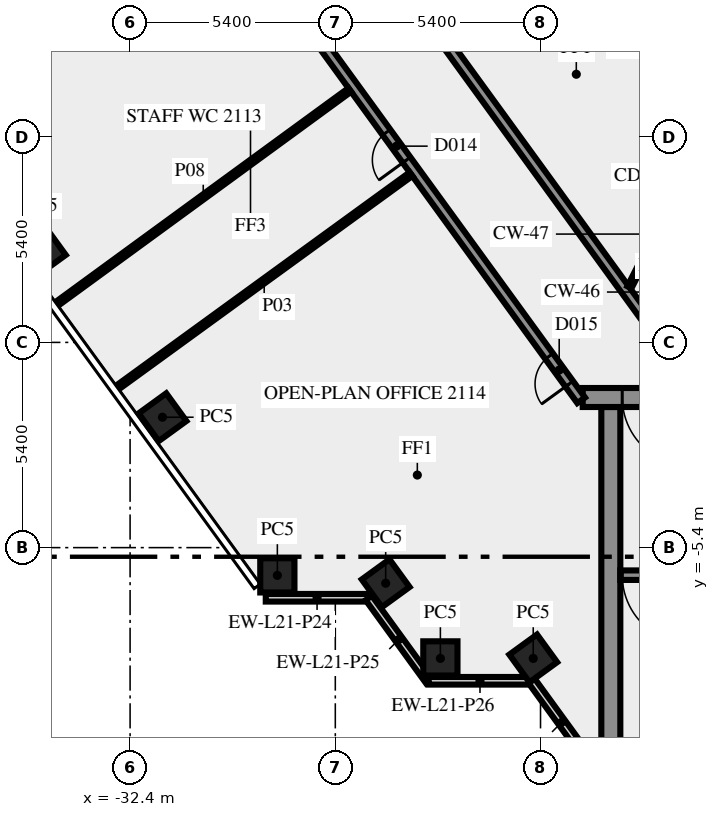
"""IFC4 building model, lengths in metres.
Left out: names, types, materials, properties, quantities, classifications, styles, units other than length and angle.
Written with IfcOpenShell. Run it as: python <this file> out.ifc"""

import sys

from ifc_helpers import new_model, si_unit, direction, frame, frame_2d, origin, origin_2d, place, context, subcontext, project, spatial, rectangle, extrude, element, fill, save


model = new_model("IFC4")
c1 = context("Model", 3, precision=1e-05, world=origin(), true_north=direction((0.0, 1.0)))
c2 = subcontext(c1, "Body", "Model", "MODEL_VIEW")
j1 = project(units=[si_unit("LENGTHUNIT", "METRE"), si_unit("PLANEANGLEUNIT", "RADIAN")], contexts=[c1])
p1 = place(None, origin())
s1 = spatial("IfcSite", under=j1, at=p1, CompositionType="ELEMENT")
p2 = place(p1, origin())
s2 = spatial("IfcBuilding", under=s1, at=p2, CompositionType="ELEMENT")
p3 = place(p2, frame((0.0, 0.0, 93.0)))
s3 = spatial("IfcBuildingStorey", under=s2, at=p3, CompositionType="ELEMENT", Elevation=93.0)
for number, where, z_axis, x_axis in (
    (1, (-34.722, 2.4, 0.0), (0.0, 0.0, 1.0), (0.588, -0.809, 0.0)),
    (2, (-31.548, -1.969, 0.0), (0.0, 0.0, 1.0), (0.588, -0.809, 0.0)),
    (3, (-28.525, -6.13, 0.0), (0.0, 0.0, 1.0), (1.0, 0.0, 0.0)),
    (4, (-25.674, -6.337, 0.0), (0.0, 0.0, 1.0), (0.588, -0.809, 0.0)),
    (5, (-24.235, -8.315, 0.0), (0.0, 0.0, 1.0), (1.0, 0.0, 0.0)),
    (6, (-21.792, -8.315, 0.0), (0.0, 0.0, 1.0), (0.588, -0.809, 0.0)),
):
    element("IfcColumn", number, at=place(p3, frame(where, z_axis=z_axis, x_axis=x_axis)), inside=s3, PredefinedType="COLUMN", context=c2, shape_type="SweptSolid", body=[
        extrude(rectangle(XDim=0.9, YDim=0.9, at=origin_2d()), origin(), (0.0, 0.0, 1.0), 3.65),
    ])
p4 = place(p3, frame((-28.83, -6.719, 0.0), z_axis=(0.0, 0.0, 1.0), x_axis=(1.0, 0.0, 0.0)))
e7 = element("IfcWall", 7, at=p4, inside=s3, PredefinedType="SOLIDWALL", context=c2, shape_type="SweptSolid", body=[
    extrude(rectangle(XDim=2.7, YDim=0.2, at=frame_2d((1.35, 0.0))), origin(), (0.0, 0.0, 1.0), 3.65),
])
p5 = place(p3, frame((-26.12, -6.724, 0.0), z_axis=(0.0, 0.0, 1.0), x_axis=(0.587720002413, -0.809064397168, 0.0)))
e8 = element("IfcWall", 8, at=p5, inside=s3, PredefinedType="SOLIDWALL", context=c2, shape_type="SweptSolid", body=[
    extrude(rectangle(XDim=2.7, YDim=0.2, at=frame_2d((1.35, 0.0))), origin(), (0.0, 0.0, 1.0), 3.65),
])
p6 = place(p3, frame((-24.543, -8.904, 0.0), z_axis=(0.0, 0.0, 1.0), x_axis=(1.0, 0.0, 0.0)))
e9 = element("IfcWall", 9, at=p6, inside=s3, PredefinedType="SOLIDWALL", context=c2, shape_type="SweptSolid", body=[
    extrude(rectangle(XDim=2.7, YDim=0.2, at=frame_2d((1.35, 0.0))), origin(), (0.0, 0.0, 1.0), 3.65),
])
p7 = place(p3, frame((-21.833, -8.909, 0.0), z_axis=(0.0, 0.0, 1.0), x_axis=(0.587766567315, -0.809030569476, 0.0)))
e10 = element("IfcWall", 10, at=p7, inside=s3, PredefinedType="SOLIDWALL", context=c2, shape_type="SweptSolid", body=[
    extrude(rectangle(XDim=2.688, YDim=0.2, at=frame_2d((1.344, 0.0))), origin(), (0.0, 0.0, 1.0), 3.65),
])
p8 = place(p3, frame((-19.75, -10.5, 0.0), z_axis=(0.0, 0.0, 1.0), x_axis=(0.0, 1.0, 0.0)))
e11 = element("IfcWall", 11, at=p8, inside=s3, PredefinedType="SHEAR", context=c2, shape_type="SweptSolid", body=[
    extrude(rectangle(XDim=8.8, YDim=0.5, at=frame_2d((4.4, 0.0))), origin(), (0.0, 0.0, 1.0), 3.65),
])
p9 = place(p3, frame((-11.45, -6.125, 0.0), z_axis=(0.0, 0.0, 1.0), x_axis=(-1.0, 0.0, 0.0)))
e12 = element("IfcWall", 12, at=p9, inside=s3, PredefinedType="SHEAR", context=c2, shape_type="SweptSolid", body=[
    extrude(rectangle(XDim=8.05, YDim=0.25, at=frame_2d((4.025, 0.0))), origin(), (0.0, 0.0, 1.0), 3.65),
])
p10 = place(p9, frame((6.2, 0.0, 0.0)))
e13 = element("IfcOpeningElement", 13, at=p10, cuts=e12, PredefinedType="OPENING", context=c2, shape_type="SweptSolid", body=[
    extrude(rectangle(XDim=1.8, YDim=2.1, at=frame_2d((0.9, 1.05))), frame((0.0, 0.135, 0.0), z_axis=(0.0, -1.0, 0.0), x_axis=(1.0, 0.0, 0.0)), (0.0, 0.0, 1.0), 0.27),
])
p11 = place(p3, frame((20.49, -1.45, 0.0), z_axis=(0.0, 0.0, 1.0), x_axis=(-1.0, 0.0, 0.0)))
e14 = element("IfcWall", 14, at=p11, inside=s3, PredefinedType="SHEAR", context=c2, shape_type="SweptSolid", body=[
    extrude(rectangle(XDim=40.98, YDim=0.5, at=frame_2d((20.49, 0.0))), origin(), (0.0, 0.0, 1.0), 3.65),
])
p12 = place(p11, frame((38.14, 0.0, 0.0)))
e15 = element("IfcOpeningElement", 15, at=p12, cuts=e14, PredefinedType="OPENING", context=c2, shape_type="SweptSolid", body=[
    extrude(rectangle(XDim=1.8, YDim=2.1, at=frame_2d((0.9, 1.05))), frame((0.0, 0.26, 0.0), z_axis=(0.0, -1.0, 0.0), x_axis=(1.0, 0.0, 0.0)), (0.0, 0.0, 1.0), 0.52),
])
p13 = place(p11, frame((35.89, 0.0, 0.0)))
e16 = element("IfcOpeningElement", 16, at=p13, cuts=e14, PredefinedType="OPENING", context=c2, shape_type="SweptSolid", body=[
    extrude(rectangle(XDim=0.9, YDim=2.1, at=frame_2d((0.45, 1.05))), frame((0.0, 0.26, 0.0), z_axis=(0.0, -1.0, 0.0), x_axis=(1.0, 0.0, 0.0)), (0.0, 0.0, 1.0), 0.52),
])
p14 = place(p11, frame((32.94, 0.0, 0.0)))
e17 = element("IfcOpeningElement", 17, at=p14, cuts=e14, PredefinedType="OPENING", context=c2, shape_type="SweptSolid", body=[
    extrude(rectangle(XDim=0.9, YDim=2.1, at=frame_2d((0.45, 1.05))), frame((0.0, 0.26, 0.0), z_axis=(0.0, -1.0, 0.0), x_axis=(1.0, 0.0, 0.0)), (0.0, 0.0, 1.0), 0.52),
])
p15 = place(p11, frame((21.765, 0.0, 0.0)))
e18 = element("IfcOpeningElement", 18, at=p15, cuts=e14, PredefinedType="OPENING", context=c2, shape_type="SweptSolid", body=[
    extrude(rectangle(XDim=2.0, YDim=2.1, at=frame_2d((1.0, 1.05))), frame((0.0, 0.26, 0.0), z_axis=(0.0, -1.0, 0.0), x_axis=(1.0, 0.0, 0.0)), (0.0, 0.0, 1.0), 0.52),
])
p16 = place(p11, frame((7.14, 0.0, 0.0)))
e19 = element("IfcOpeningElement", 19, at=p16, cuts=e14, PredefinedType="OPENING", context=c2, shape_type="SweptSolid", body=[
    extrude(rectangle(XDim=0.9, YDim=2.1, at=frame_2d((0.45, 1.05))), frame((0.0, 0.26, 0.0), z_axis=(0.0, -1.0, 0.0), x_axis=(1.0, 0.0, 0.0)), (0.0, 0.0, 1.0), 0.52),
])
p17 = place(p11, frame((5.028, 0.0, 0.0)))
e20 = element("IfcOpeningElement", 20, at=p17, cuts=e14, PredefinedType="OPENING", context=c2, shape_type="SweptSolid", body=[
    extrude(rectangle(XDim=0.8, YDim=2.1, at=frame_2d((0.4, 1.05))), frame((0.0, 0.26, 0.0), z_axis=(0.0, -1.0, 0.0), x_axis=(1.0, 0.0, 0.0)), (0.0, 0.0, 1.0), 0.52),
])
p18 = place(p11, frame((3.452, 0.0, 0.0)))
e21 = element("IfcOpeningElement", 21, at=p18, cuts=e14, PredefinedType="OPENING", context=c2, shape_type="SweptSolid", body=[
    extrude(rectangle(XDim=0.8, YDim=2.1, at=frame_2d((0.4, 1.05))), frame((0.0, 0.26, 0.0), z_axis=(0.0, -1.0, 0.0), x_axis=(1.0, 0.0, 0.0)), (0.0, 0.0, 1.0), 0.52),
])
p19 = place(p11, frame((1.04, 0.0, 0.0)))
e22 = element("IfcOpeningElement", 22, at=p19, cuts=e14, PredefinedType="OPENING", context=c2, shape_type="SweptSolid", body=[
    extrude(rectangle(XDim=1.8, YDim=2.1, at=frame_2d((0.9, 1.05))), frame((0.0, 0.26, 0.0), z_axis=(0.0, -1.0, 0.0), x_axis=(1.0, 0.0, 0.0)), (0.0, 0.0, 1.0), 0.52),
])
p20 = place(p3, frame((-20.531, -1.523, 0.0), z_axis=(0.0, 0.0, 1.0), x_axis=(-0.587784522481, 0.809017524614, 0.0)))
e23 = element("IfcWall", 23, at=p20, inside=s3, PredefinedType="SOLIDWALL", context=c2, shape_type="SweptSolid", body=[
    extrude(rectangle(XDim=49.912, YDim=0.25, at=frame_2d((24.956, 0.0))), origin(), (0.0, 0.0, 1.0), 3.65),
])
p21 = place(p20, frame((0.533, 0.0, 0.0)))
e24 = element("IfcOpeningElement", 24, at=p21, cuts=e23, PredefinedType="OPENING", context=c2, shape_type="SweptSolid", body=[
    extrude(rectangle(XDim=0.9, YDim=2.1, at=frame_2d((0.45, 1.05))), frame((0.0, 0.135, 0.0), z_axis=(0.0, -1.0, 0.0), x_axis=(1.0, 0.0, 0.0)), (0.0, 0.0, 1.0), 0.27),
])
p22 = place(p20, frame((48.47, 0.0, 0.0)))
e25 = element("IfcOpeningElement", 25, at=p22, cuts=e23, PredefinedType="OPENING", context=c2, shape_type="SweptSolid", body=[
    extrude(rectangle(XDim=1.0, YDim=2.1, at=frame_2d((0.5, 1.05))), frame((0.0, 0.135, 0.0), z_axis=(0.0, -1.0, 0.0), x_axis=(1.0, 0.0, 0.0)), (0.0, 0.0, 1.0), 0.27),
])
p23 = place(p20, frame((17.365, 0.0, 0.0)))
e26 = element("IfcOpeningElement", 26, at=p23, cuts=e23, PredefinedType="OPENING", context=c2, shape_type="SweptSolid", body=[
    extrude(rectangle(XDim=1.8, YDim=2.1, at=frame_2d((0.9, 1.05))), frame((0.0, 0.135, 0.0), z_axis=(0.0, -1.0, 0.0), x_axis=(1.0, 0.0, 0.0)), (0.0, 0.0, 1.0), 0.27),
])
p24 = place(p20, frame((7.816, 0.0, 0.0)))
e27 = element("IfcOpeningElement", 27, at=p24, cuts=e23, PredefinedType="OPENING", context=c2, shape_type="SweptSolid", body=[
    extrude(rectangle(XDim=0.9, YDim=2.1, at=frame_2d((0.45, 1.05))), frame((0.0, 0.135, 0.0), z_axis=(0.0, -1.0, 0.0), x_axis=(1.0, 0.0, 0.0)), (0.0, 0.0, 1.0), 0.27),
])
p25 = place(p3, frame((-37.232, 25.972, 0.0), z_axis=(0.0, 0.0, 1.0), x_axis=(0.587786323093, -0.809016216391, 0.0)))
e28 = element("IfcWall", 28, at=p25, inside=s3, PredefinedType="SOLIDWALL", context=c2, shape_type="SweptSolid", body=[
    extrude(rectangle(XDim=33.493, YDim=0.25, at=frame_2d((16.747, 0.0))), origin(), (0.0, 0.0, 1.0), 3.65),
])
p26 = place(p25, frame((19.135, 0.0, 0.0)))
e29 = element("IfcOpeningElement", 29, at=p26, cuts=e28, PredefinedType="OPENING", context=c2, shape_type="SweptSolid", body=[
    extrude(rectangle(XDim=0.9, YDim=2.1, at=frame_2d((0.45, 1.05))), frame((0.0, 0.135, 0.0), z_axis=(0.0, -1.0, 0.0), x_axis=(1.0, 0.0, 0.0)), (0.0, 0.0, 1.0), 0.27),
])
p27 = place(p25, frame((7.137, 0.0, 0.0)))
e30 = element("IfcOpeningElement", 30, at=p27, cuts=e28, PredefinedType="OPENING", context=c2, shape_type="SweptSolid", body=[
    extrude(rectangle(XDim=1.8, YDim=2.1, at=frame_2d((0.9, 1.05))), frame((0.0, 0.135, 0.0), z_axis=(0.0, -1.0, 0.0), x_axis=(1.0, 0.0, 0.0)), (0.0, 0.0, 1.0), 0.27),
])
p28 = place(p25, frame((16.435, 0.0, 0.0)))
e31 = element("IfcOpeningElement", 31, at=p28, cuts=e28, PredefinedType="OPENING", context=c2, shape_type="SweptSolid", body=[
    extrude(rectangle(XDim=0.9, YDim=2.1, at=frame_2d((0.45, 1.05))), frame((0.0, 0.135, 0.0), z_axis=(0.0, -1.0, 0.0), x_axis=(1.0, 0.0, 0.0)), (0.0, 0.0, 1.0), 0.27),
])
p29 = place(p3, frame((-25.008, 4.427, 0.0), z_axis=(0.0, 0.0, 1.0), x_axis=(-0.808994684961, -0.587815957341, 0.0)))
e32 = element("IfcWall", 32, at=p29, inside=s3, PredefinedType="PARTITIONING", context=c2, shape_type="SweptSolid", body=[
    extrude(rectangle(XDim=9.55, YDim=0.12, at=frame_2d((4.775, 0.0))), origin(), (0.0, 0.0, 1.0), 2.75),
])
p30 = place(p3, frame((-34.332, 1.011, 0.0), z_axis=(0.0, 0.0, 1.0), x_axis=(0.807594822539, 0.589737740532, 0.0)))
e33 = element("IfcWall", 33, at=p30, inside=s3, PredefinedType="PARTITIONING", context=c2, shape_type="SweptSolid", body=[
    extrude(rectangle(XDim=9.55, YDim=0.12, at=frame_2d((4.775, 0.0))), origin(), (0.0, 0.0, 1.0), 2.75),
])
p31 = place(p3, frame((-19.261, 1.45, 0.0), z_axis=(0.0, 0.0, 1.0), x_axis=(0.453950796792, 0.891026752736, 0.0)))
e34 = element("IfcWall", 34, at=p31, inside=s3, PredefinedType="PARTITIONING", context=c2, shape_type="SweptSolid", body=[
    extrude(rectangle(XDim=2.778, YDim=0.12, at=frame_2d((1.389, 0.0))), origin(), (0.0, 0.0, 1.0), 3.65),
])
p32 = place(p10, origin())
e35 = element("IfcDoor", 35, at=p32, inside=s3, OperationType="DOUBLE_DOOR_SINGLE_SWING", PredefinedType="DOOR", context=c2, shape_type="SweptSolid", body=[
    extrude(rectangle(XDim=1.8, YDim=2.1, at=frame_2d((0.9, 1.05))), frame((0.0, 0.025, 0.0), z_axis=(0.0, -1.0, 0.0), x_axis=(1.0, 0.0, 0.0)), (0.0, 0.0, 1.0), 0.05),
])
fill(e13, e35)
p33 = place(p12, origin())
e36 = element("IfcDoor", 36, at=p33, inside=s3, OperationType="DOUBLE_DOOR_SINGLE_SWING", PredefinedType="DOOR", context=c2, shape_type="SweptSolid", body=[
    extrude(rectangle(XDim=1.8, YDim=2.1, at=frame_2d((0.9, 1.05))), frame((0.0, 0.025, 0.0), z_axis=(0.0, -1.0, 0.0), x_axis=(1.0, 0.0, 0.0)), (0.0, 0.0, 1.0), 0.05),
])
fill(e15, e36)
p34 = place(p21, origin())
e37 = element("IfcDoor", 37, at=p34, inside=s3, OperationType="SINGLE_SWING_LEFT", PredefinedType="DOOR", context=c2, shape_type="SweptSolid", body=[
    extrude(rectangle(XDim=0.9, YDim=2.1, at=frame_2d((0.45, 1.05))), frame((0.0, 0.025, 0.0), z_axis=(0.0, -1.0, 0.0), x_axis=(1.0, 0.0, 0.0)), (0.0, 0.0, 1.0), 0.05),
])
fill(e24, e37)
p35 = place(p24, origin())
e38 = element("IfcDoor", 38, at=p35, inside=s3, OperationType="SINGLE_SWING_LEFT", PredefinedType="DOOR", context=c2, shape_type="SweptSolid", body=[
    extrude(rectangle(XDim=0.9, YDim=2.1, at=frame_2d((0.45, 1.05))), frame((0.0, 0.025, 0.0), z_axis=(0.0, -1.0, 0.0), x_axis=(1.0, 0.0, 0.0)), (0.0, 0.0, 1.0), 0.05),
])
fill(e27, e38)
save(model, sys.argv[1])
